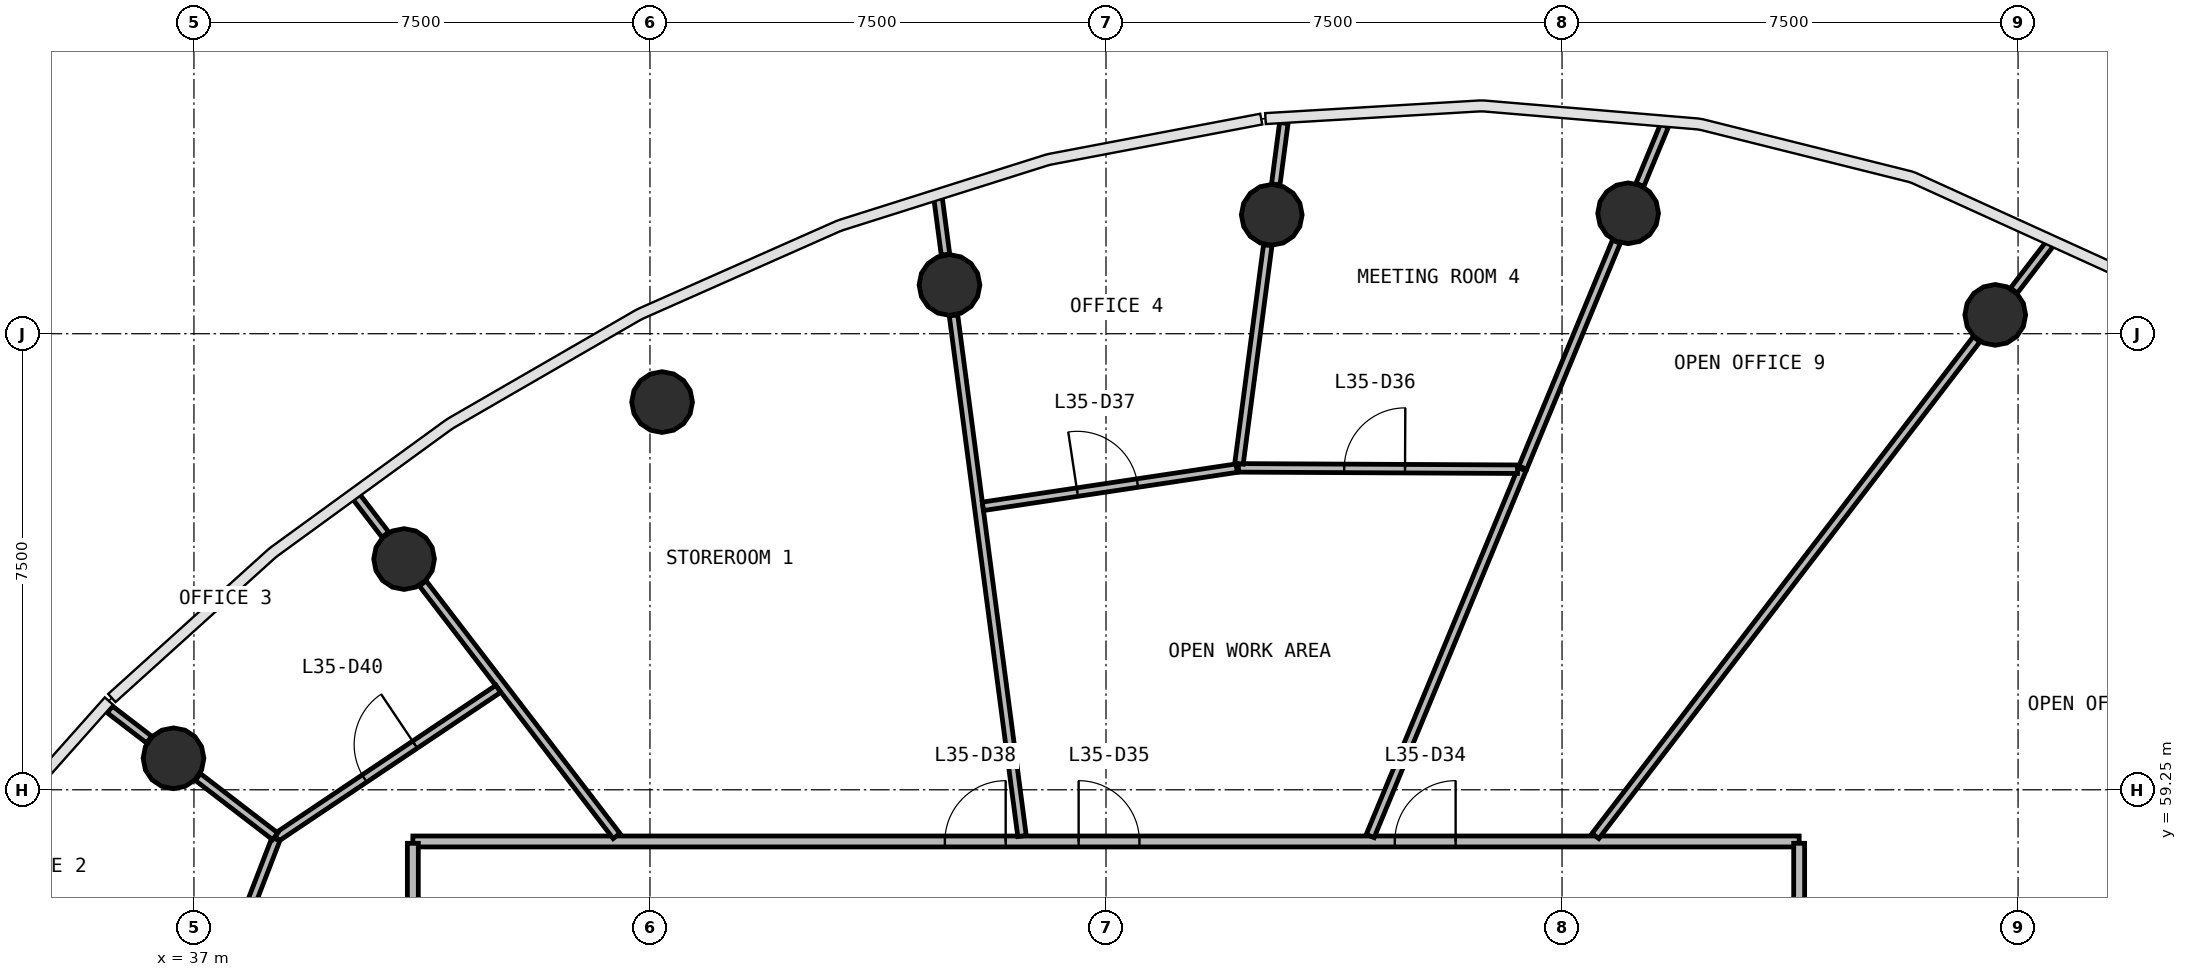
"""IFC4 building model, lengths in metres.
Left out: names, types, materials, properties, quantities, classifications, styles, units other than length and angle.
Written with IfcOpenShell. Run it as: python <this file> out.ifc"""

import sys

from ifc_helpers import new_model, si_unit, direction, frame, frame_2d, origin, origin_2d, place, context, subcontext, project, spatial, rectangle, circle, extrude, source, transform, mapped, element, fill, save


model = new_model("IFC4")
c1 = context("Model", 3, precision=1e-05, world=origin(), true_north=direction((0.0, 1.0)))
c2 = subcontext(c1, "Body", "Model", "MODEL_VIEW")
j1 = project(units=[si_unit("LENGTHUNIT", "METRE"), si_unit("PLANEANGLEUNIT", "RADIAN")], contexts=[c1])
p1 = place(None, origin())
s1 = spatial("IfcSite", under=j1, at=p1, CompositionType="ELEMENT")
p2 = place(p1, origin())
s2 = spatial("IfcBuilding", under=s1, at=p2, CompositionType="ELEMENT")
p3 = place(p2, frame((0.0, 0.0, 148.7)))
s3 = spatial("IfcBuildingStorey", under=s2, at=p3, CompositionType="ELEMENT", Elevation=148.7)
m1 = source(origin(), c2, "Body", "SweptSolid", [
    extrude(circle(Radius=0.5, at=origin_2d()), origin(), (0.0, 0.0, 1.0), 3.9),
])
for number, where, z_axis, x_axis in (
    (1, (66.625, 67.06, 0.0), (0.0, 0.0, 1.0), (1.0, 0.0, 0.0)),
    (2, (60.587, 68.731, 0.0), (0.0, 0.0, 1.0), (1.0, 0.0, 0.0)),
    (3, (54.726, 68.705, 0.0), (0.0, 0.0, 1.0), (1.0, 0.0, 0.0)),
    (4, (49.426, 67.551, 0.0), (0.0, 0.0, 1.0), (1.0, 0.0, 0.0)),
    (5, (44.699, 65.626, 0.0), (0.0, 0.0, 1.0), (1.0, 0.0, 0.0)),
    (6, (40.456, 63.044, 0.0), (0.0, 0.0, 1.0), (1.0, 0.0, 0.0)),
    (7, (36.664, 59.768, 0.0), (0.0, 0.0, 1.0), (1.0, 0.0, 0.0)),
):
    element("IfcColumn", number, at=place(p3, frame(where, z_axis=z_axis, x_axis=x_axis)), inside=s3, PredefinedType="COLUMN", context=c2, shape_type="MappedRepresentation", body=[
        mapped(m1, transform((0.0, 0.0, 0.0), scale=1.0)),
    ])
p4 = place(p3, frame((40.6, 58.4, 0.0), z_axis=(0.0, 0.0, 1.0), x_axis=(1.0, 0.0, 0.0)))
e8 = element("IfcWall", 8, at=p4, inside=s3, PredefinedType="PARTITIONING", context=c2, shape_type="SweptSolid", body=[
    extrude(rectangle(XDim=22.8, YDim=0.18, at=frame_2d((11.4, 0.0))), origin(), (0.0, 0.0, 1.0), 2.88),
])
p5 = place(p4, frame((16.15, 0.0, 0.0)))
e9 = element("IfcOpeningElement", 9, at=p5, cuts=e8, PredefinedType="OPENING", context=c2, shape_type="SweptSolid", body=[
    extrude(rectangle(XDim=1.0, YDim=2.1, at=frame_2d((0.5, 1.05))), frame((0.0, 0.1, 0.0), z_axis=(0.0, -1.0, 0.0), x_axis=(1.0, 0.0, 0.0)), (0.0, 0.0, 1.0), 0.2),
])
p6 = place(p4, frame((10.95, 0.0, 0.0)))
e10 = element("IfcOpeningElement", 10, at=p6, cuts=e8, PredefinedType="OPENING", context=c2, shape_type="SweptSolid", body=[
    extrude(rectangle(XDim=1.0, YDim=2.1, at=frame_2d((0.5, 1.05))), frame((0.0, 0.1, 0.0), z_axis=(0.0, -1.0, 0.0), x_axis=(1.0, 0.0, 0.0)), (0.0, 0.0, 1.0), 0.2),
])
p7 = place(p4, frame((8.75, 0.0, 0.0)))
e11 = element("IfcOpeningElement", 11, at=p7, cuts=e8, PredefinedType="OPENING", context=c2, shape_type="SweptSolid", body=[
    extrude(rectangle(XDim=1.0, YDim=2.1, at=frame_2d((0.5, 1.05))), frame((0.0, 0.1, 0.0), z_axis=(0.0, -1.0, 0.0), x_axis=(1.0, 0.0, 0.0)), (0.0, 0.0, 1.0), 0.2),
])
p8 = place(p3, frame((63.4, 58.37, 0.0), z_axis=(0.0, 0.0, 1.0), x_axis=(0.0, -1.0, 0.0)))
e12 = element("IfcWall", 12, at=p8, inside=s3, PredefinedType="PARTITIONING", context=c2, shape_type="SweptSolid", body=[
    extrude(rectangle(XDim=20.74, YDim=0.18, at=frame_2d((10.37, 0.0))), origin(), (0.0, 0.0, 1.0), 2.88),
])
p9 = place(p8, frame((9.89, 0.0, 0.0)))
e13 = element("IfcOpeningElement", 13, at=p9, cuts=e12, PredefinedType="OPENING", context=c2, shape_type="SweptSolid", body=[
    extrude(rectangle(XDim=1.0, YDim=2.1, at=frame_2d((0.5, 1.05))), frame((0.0, 0.1, 0.0), z_axis=(0.0, -1.0, 0.0), x_axis=(1.0, 0.0, 0.0)), (0.0, 0.0, 1.0), 0.2),
])
p10 = place(p8, frame((7.69, 0.0, 0.0)))
e14 = element("IfcOpeningElement", 14, at=p10, cuts=e12, PredefinedType="OPENING", context=c2, shape_type="SweptSolid", body=[
    extrude(rectangle(XDim=1.0, YDim=2.1, at=frame_2d((0.5, 1.05))), frame((0.0, 0.1, 0.0), z_axis=(0.0, -1.0, 0.0), x_axis=(1.0, 0.0, 0.0)), (0.0, 0.0, 1.0), 0.2),
])
p11 = place(p8, frame((4.29, 0.0, 0.0)))
e15 = element("IfcOpeningElement", 15, at=p11, cuts=e12, PredefinedType="OPENING", context=c2, shape_type="SweptSolid", body=[
    extrude(rectangle(XDim=1.0, YDim=2.1, at=frame_2d((0.5, 1.05))), frame((0.0, 0.1, 0.0), z_axis=(0.0, -1.0, 0.0), x_axis=(1.0, 0.0, 0.0)), (0.0, 0.0, 1.0), 0.2),
])
p12 = place(p3, frame((40.6, 37.63, 0.0), z_axis=(0.0, 0.0, 1.0), x_axis=(0.0, 1.0, 0.0)))
e16 = element("IfcWall", 16, at=p12, inside=s3, PredefinedType="PARTITIONING", context=c2, shape_type="SweptSolid", body=[
    extrude(rectangle(XDim=20.74, YDim=0.18, at=frame_2d((10.37, 0.0))), origin(), (0.0, 0.0, 1.0), 2.88),
])
p13 = place(p12, frame((15.49, 0.0, 0.0)))
e17 = element("IfcOpeningElement", 17, at=p13, cuts=e16, PredefinedType="OPENING", context=c2, shape_type="SweptSolid", body=[
    extrude(rectangle(XDim=1.0, YDim=2.1, at=frame_2d((0.5, 1.05))), frame((0.0, 0.1, 0.0), z_axis=(0.0, -1.0, 0.0), x_axis=(1.0, 0.0, 0.0)), (0.0, 0.0, 1.0), 0.2),
])
p14 = place(p12, frame((12.09, 0.0, 0.0)))
e18 = element("IfcOpeningElement", 18, at=p14, cuts=e16, PredefinedType="OPENING", context=c2, shape_type="SweptSolid", body=[
    extrude(rectangle(XDim=1.0, YDim=2.1, at=frame_2d((0.5, 1.05))), frame((0.0, 0.1, 0.0), z_axis=(0.0, -1.0, 0.0), x_axis=(1.0, 0.0, 0.0)), (0.0, 0.0, 1.0), 0.2),
])
p15 = place(p12, frame((9.89, 0.0, 0.0)))
e19 = element("IfcOpeningElement", 19, at=p15, cuts=e16, PredefinedType="OPENING", context=c2, shape_type="SweptSolid", body=[
    extrude(rectangle(XDim=1.0, YDim=2.1, at=frame_2d((0.5, 1.05))), frame((0.0, 0.1, 0.0), z_axis=(0.0, -1.0, 0.0), x_axis=(1.0, 0.0, 0.0)), (0.0, 0.0, 1.0), 0.2),
])
p16 = place(p12, frame((4.29, 0.0, 0.0)))
e20 = element("IfcOpeningElement", 20, at=p16, cuts=e16, PredefinedType="OPENING", context=c2, shape_type="SweptSolid", body=[
    extrude(rectangle(XDim=1.0, YDim=2.1, at=frame_2d((0.5, 1.05))), frame((0.0, 0.1, 0.0), z_axis=(0.0, -1.0, 0.0), x_axis=(1.0, 0.0, 0.0)), (0.0, 0.0, 1.0), 0.2),
])
p17 = place(p3, frame((60.049, 58.49, 0.0), z_axis=(0.0, 0.0, 1.0), x_axis=(0.608768467527, 0.793347939396, 0.0)))
e21 = element("IfcWall", 21, at=p17, inside=s3, PredefinedType="PARTITIONING", context=c2, shape_type="SweptSolid", body=[
    extrude(rectangle(XDim=10.297, YDim=0.14, at=frame_2d((5.148, 0.0))), origin(), (0.0, 0.0, 1.0), 2.88),
])
p18 = place(p3, frame((49.492, 67.051, 0.0), z_axis=(0.0, 0.0, 1.0), x_axis=(0.130507901859, -0.991447269174, 0.0)))
e22 = element("IfcWall", 22, at=p18, inside=s3, PredefinedType="PARTITIONING", context=c2, shape_type="SweptSolid", body=[
    extrude(rectangle(XDim=8.635, YDim=0.14, at=frame_2d((4.318, 0.0))), origin(), (0.0, 0.0, 1.0), 2.88),
])
p19 = place(p3, frame((56.345, 58.49, 0.0), z_axis=(0.0, 0.0, 1.0), x_axis=(0.382678770184, 0.923881463636, 0.0)))
e23 = element("IfcWall", 23, at=p19, inside=s3, PredefinedType="PARTITIONING", context=c2, shape_type="SweptSolid", body=[
    extrude(rectangle(XDim=6.528, YDim=0.14, at=frame_2d((3.264, 0.0))), origin(), (0.0, 0.0, 1.0), 2.88),
])
p20 = place(p3, frame((40.763, 62.644, 0.0), z_axis=(0.0, 0.0, 1.0), x_axis=(0.608736894437, -0.793372165728, 0.0)))
e24 = element("IfcWall", 24, at=p20, inside=s3, PredefinedType="PARTITIONING", context=c2, shape_type="SweptSolid", body=[
    extrude(rectangle(XDim=5.236, YDim=0.14, at=frame_2d((2.618, 0.0))), origin(), (0.0, 0.0, 1.0), 2.88),
])
p21 = place(p3, frame((54.178, 64.544, 0.0), z_axis=(0.0, 0.0, 1.0), x_axis=(0.999988285346, -0.004840368828, 0.0)))
e25 = element("IfcWall", 25, at=p21, inside=s3, PredefinedType="PARTITIONING", context=c2, shape_type="SweptSolid", body=[
    extrude(rectangle(XDim=4.59, YDim=0.14, at=frame_2d((2.295, 0.0))), origin(), (0.0, 0.0, 1.0), 2.88),
])
p22 = place(p21, frame((1.74, 0.0, 0.0)))
e26 = element("IfcOpeningElement", 26, at=p22, cuts=e25, PredefinedType="OPENING", context=c2, shape_type="SweptSolid", body=[
    extrude(rectangle(XDim=1.0, YDim=2.1, at=frame_2d((0.5, 1.05))), frame((0.0, 0.08, 0.0), z_axis=(0.0, -1.0, 0.0), x_axis=(1.0, 0.0, 0.0)), (0.0, 0.0, 1.0), 0.16),
])
p23 = place(p3, frame((38.359, 58.467, 0.0), z_axis=(0.0, 0.0, 1.0), x_axis=(0.830687145269, 0.55673949625, 0.0)))
e27 = element("IfcWall", 27, at=p23, inside=s3, PredefinedType="PARTITIONING", context=c2, shape_type="SweptSolid", body=[
    extrude(rectangle(XDim=4.389, YDim=0.14, at=frame_2d((2.195, 0.0))), origin(), (0.0, 0.0, 1.0), 2.88),
])
p24 = place(p23, frame((1.739, 0.0, 0.0)))
e28 = element("IfcOpeningElement", 28, at=p24, cuts=e27, PredefinedType="OPENING", context=c2, shape_type="SweptSolid", body=[
    extrude(rectangle(XDim=1.0, YDim=2.1, at=frame_2d((0.5, 1.05))), frame((0.0, 0.08, 0.0), z_axis=(0.0, -1.0, 0.0), x_axis=(1.0, 0.0, 0.0)), (0.0, 0.0, 1.0), 0.16),
])
p25 = place(p3, frame((36.78, 54.38, 0.0), z_axis=(0.0, 0.0, 1.0), x_axis=(0.360482491494, 0.932765979936, 0.0)))
e29 = element("IfcWall", 29, at=p25, inside=s3, PredefinedType="PARTITIONING", context=c2, shape_type="SweptSolid", body=[
    extrude(rectangle(XDim=4.351, YDim=0.14, at=frame_2d((2.176, 0.0))), origin(), (0.0, 0.0, 1.0), 2.88),
])
p26 = place(p25, frame((1.701, 0.0, 0.0)))
e30 = element("IfcOpeningElement", 30, at=p26, cuts=e29, PredefinedType="OPENING", context=c2, shape_type="SweptSolid", body=[
    extrude(rectangle(XDim=1.0, YDim=2.1, at=frame_2d((0.5, 1.05))), frame((0.0, 0.08, 0.0), z_axis=(0.0, -1.0, 0.0), x_axis=(1.0, 0.0, 0.0)), (0.0, 0.0, 1.0), 0.16),
])
p27 = place(p3, frame((49.976, 63.912, 0.0), z_axis=(0.0, 0.0, 1.0), x_axis=(0.988865366458, 0.14881292625, 0.0)))
e31 = element("IfcWall", 31, at=p27, inside=s3, PredefinedType="PARTITIONING", context=c2, shape_type="SweptSolid", body=[
    extrude(rectangle(XDim=4.219, YDim=0.14, at=frame_2d((2.11, 0.0))), origin(), (0.0, 0.0, 1.0), 2.88),
])
p28 = place(p27, frame((1.57, 0.0, 0.0)))
e32 = element("IfcOpeningElement", 32, at=p28, cuts=e31, PredefinedType="OPENING", context=c2, shape_type="SweptSolid", body=[
    extrude(rectangle(XDim=1.0, YDim=2.1, at=frame_2d((0.5, 1.05))), frame((0.0, 0.08, 0.0), z_axis=(0.0, -1.0, 0.0), x_axis=(1.0, 0.0, 0.0)), (0.0, 0.0, 1.0), 0.16),
])
p29 = place(p3, frame((58.855, 64.549, 0.0), z_axis=(0.0, 0.0, 1.0), x_axis=(0.38270923815, 0.923868842983, 0.0)))
e33 = element("IfcWall", 33, at=p29, inside=s3, PredefinedType="PARTITIONING", context=c2, shape_type="SweptSolid", body=[
    extrude(rectangle(XDim=4.021, YDim=0.14, at=frame_2d((2.011, 0.0))), origin(), (0.0, 0.0, 1.0), 2.88),
])
p30 = place(p3, frame((54.187, 64.614, 0.0), z_axis=(0.0, 0.0, 1.0), x_axis=(0.130560871019, 0.991440295206, 0.0)))
e34 = element("IfcWall", 34, at=p30, inside=s3, PredefinedType="PARTITIONING", context=c2, shape_type="SweptSolid", body=[
    extrude(rectangle(XDim=3.622, YDim=0.14, at=frame_2d((1.811, 0.0))), origin(), (0.0, 0.0, 1.0), 2.88),
])
p31 = place(p3, frame((38.335, 58.485, 0.0), z_axis=(0.0, 0.0, 1.0), x_axis=(-0.793297349566, 0.608834390595, 0.0)))
e35 = element("IfcWall", 35, at=p31, inside=s3, PredefinedType="PARTITIONING", context=c2, shape_type="SweptSolid", body=[
    extrude(rectangle(XDim=1.603, YDim=0.14, at=frame_2d((0.801, 0.0))), origin(), (0.0, 0.0, 1.0), 2.88),
])
p32 = place(p3, frame((60.78, 69.198, 0.0), z_axis=(0.0, 0.0, 1.0), x_axis=(0.382658470946, 0.923889871474, 0.0)))
e36 = element("IfcWall", 36, at=p32, inside=s3, PredefinedType="PARTITIONING", context=c2, shape_type="SweptSolid", body=[
    extrude(rectangle(XDim=1.055, YDim=0.14, at=frame_2d((0.527, 0.0))), origin(), (0.0, 0.0, 1.0), 2.88),
])
p33 = place(p3, frame((54.792, 69.205, 0.0), z_axis=(0.0, 0.0, 1.0), x_axis=(0.130609492545, 0.991433891118, 0.0)))
e37 = element("IfcWall", 37, at=p33, inside=s3, PredefinedType="PARTITIONING", context=c2, shape_type="SweptSolid", body=[
    extrude(rectangle(XDim=1.019, YDim=0.14, at=frame_2d((0.509, 0.0))), origin(), (0.0, 0.0, 1.0), 2.88),
])
p34 = place(p3, frame((66.932, 67.46, 0.0), z_axis=(0.0, 0.0, 1.0), x_axis=(0.608854774338, 0.793281705175, 0.0)))
e38 = element("IfcWall", 38, at=p34, inside=s3, PredefinedType="PARTITIONING", context=c2, shape_type="SweptSolid", body=[
    extrude(rectangle(XDim=0.993, YDim=0.14, at=frame_2d((0.497, 0.0))), origin(), (0.0, 0.0, 1.0), 2.88),
])
p35 = place(p3, frame((49.36, 68.052, 0.0), z_axis=(0.0, 0.0, 1.0), x_axis=(-0.130488267119, 0.99144985357, 0.0)))
e39 = element("IfcWall", 39, at=p35, inside=s3, PredefinedType="PARTITIONING", context=c2, shape_type="SweptSolid", body=[
    extrude(rectangle(XDim=0.936, YDim=0.14, at=frame_2d((0.468, 0.0))), origin(), (0.0, 0.0, 1.0), 2.88),
])
p36 = place(p3, frame((36.263, 60.075, 0.0), z_axis=(0.0, 0.0, 1.0), x_axis=(-0.79344724315, 0.608639032873, 0.0)))
e40 = element("IfcWall", 40, at=p36, inside=s3, PredefinedType="PARTITIONING", context=c2, shape_type="SweptSolid", body=[
    extrude(rectangle(XDim=0.815, YDim=0.14, at=frame_2d((0.408, 0.0))), origin(), (0.0, 0.0, 1.0), 2.88),
])
p37 = place(p3, frame((40.149, 63.445, 0.0), z_axis=(0.0, 0.0, 1.0), x_axis=(-0.608886809997, 0.793257116332, 0.0)))
e41 = element("IfcWall", 41, at=p37, inside=s3, PredefinedType="PARTITIONING", context=c2, shape_type="SweptSolid", body=[
    extrude(rectangle(XDim=0.788, YDim=0.14, at=frame_2d((0.394, 0.0))), origin(), (0.0, 0.0, 1.0), 2.88),
])
m2 = source(origin(), c2, "Body", "SweptSolid", [
    extrude(rectangle(XDim=1.0, YDim=2.1, at=frame_2d((0.5, 1.05))), frame((0.0, 0.025, 0.0), z_axis=(0.0, -1.0, 0.0), x_axis=(1.0, 0.0, 0.0)), (0.0, 0.0, 1.0), 0.05),
])
p38 = place(p5, origin())
e42 = element("IfcDoor", 42, at=p38, inside=s3, OperationType="SINGLE_SWING_RIGHT", PredefinedType="DOOR", context=c2, shape_type="MappedRepresentation", body=[
    mapped(m2, transform((0.0, 0.0, 0.0), scale=1.0)),
])
fill(e9, e42)
p39 = place(p6, origin())
e43 = element("IfcDoor", 43, at=p39, inside=s3, OperationType="SINGLE_SWING_LEFT", PredefinedType="DOOR", context=c2, shape_type="MappedRepresentation", body=[
    mapped(m2, transform((0.0, 0.0, 0.0), scale=1.0)),
])
fill(e10, e43)
p40 = place(p22, origin())
e44 = element("IfcDoor", 44, at=p40, inside=s3, OperationType="SINGLE_SWING_RIGHT", PredefinedType="DOOR", context=c2, shape_type="MappedRepresentation", body=[
    mapped(m2, transform((0.0, 0.0, 0.0), scale=1.0)),
])
fill(e26, e44)
p41 = place(p28, origin())
e45 = element("IfcDoor", 45, at=p41, inside=s3, OperationType="SINGLE_SWING_LEFT", PredefinedType="DOOR", context=c2, shape_type="MappedRepresentation", body=[
    mapped(m2, transform((0.0, 0.0, 0.0), scale=1.0)),
])
fill(e32, e45)
p42 = place(p7, origin())
e46 = element("IfcDoor", 46, at=p42, inside=s3, OperationType="SINGLE_SWING_RIGHT", PredefinedType="DOOR", context=c2, shape_type="MappedRepresentation", body=[
    mapped(m2, transform((0.0, 0.0, 0.0), scale=1.0)),
])
fill(e11, e46)
p43 = place(p24, origin())
e47 = element("IfcDoor", 47, at=p43, inside=s3, OperationType="SINGLE_SWING_RIGHT", PredefinedType="DOOR", context=c2, shape_type="MappedRepresentation", body=[
    mapped(m2, transform((0.0, 0.0, 0.0), scale=1.0)),
])
fill(e28, e47)
save(model, sys.argv[1])
